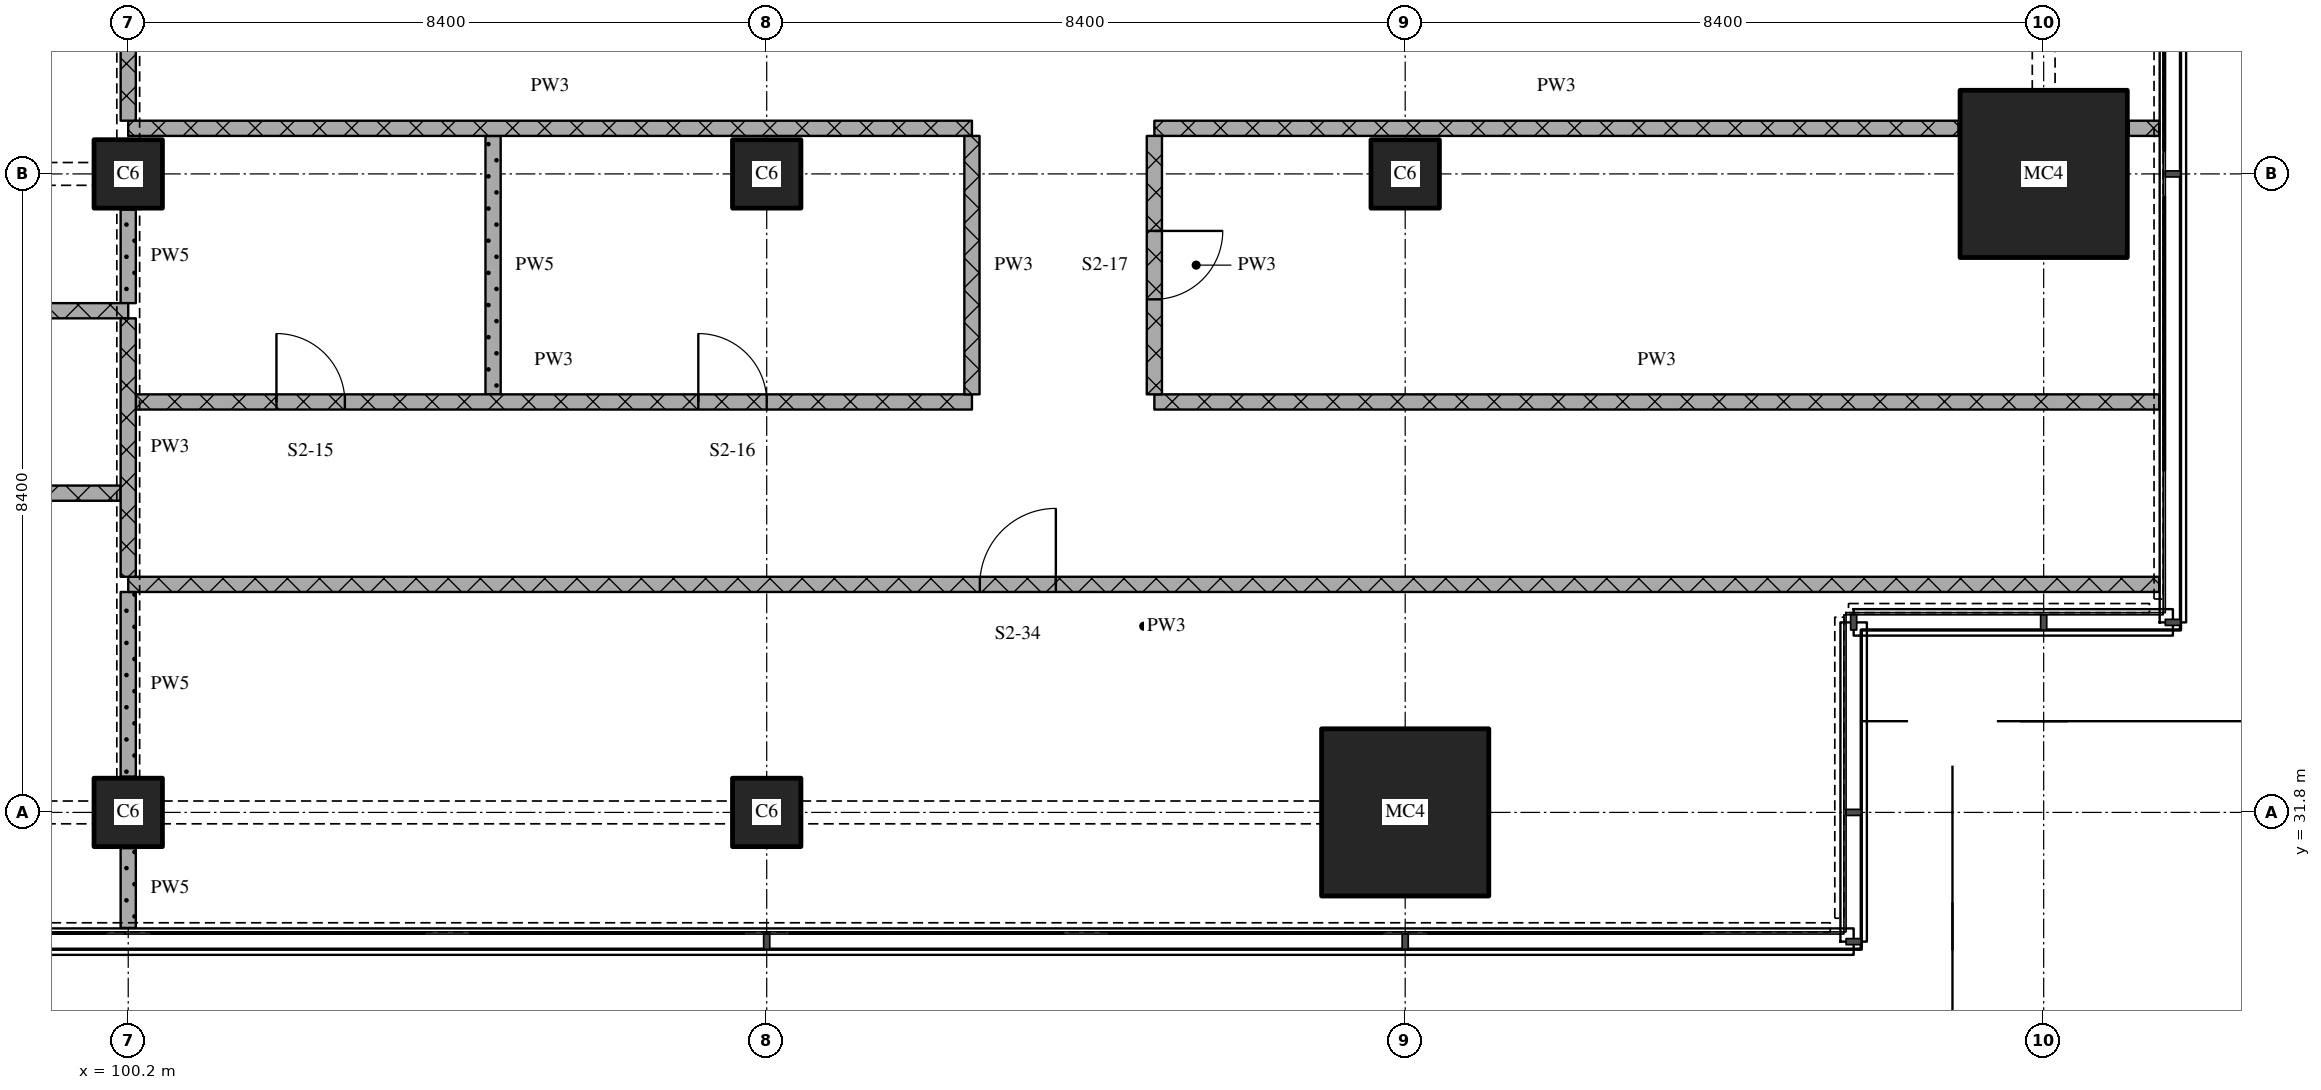
"""IFC4 building model, lengths in metres.
Left out: names, types, materials, properties, quantities, classifications, styles, units other than length and angle.
Written with IfcOpenShell. Run it as: python <this file> out.ifc"""

import sys

from ifc_helpers import new_model, si_unit, direction, frame, frame_2d, origin, origin_2d, place, context, subcontext, project, spatial, rectangle, extrude, element, fill, save


model = new_model("IFC4")
c1 = context("Model", 3, precision=1e-05, world=origin(), true_north=direction((0.0, 1.0)))
c2 = subcontext(c1, "Body", "Model", "MODEL_VIEW")
j1 = project(units=[si_unit("LENGTHUNIT", "METRE"), si_unit("PLANEANGLEUNIT", "RADIAN")], contexts=[c1])
p1 = place(None, origin())
s1 = spatial("IfcSite", under=j1, at=p1, CompositionType="ELEMENT")
p2 = place(p1, origin())
s2 = spatial("IfcBuilding", under=s1, at=p2, CompositionType="ELEMENT")
p3 = place(p2, frame((0.0, 0.0, 28.2)))
s3 = spatial("IfcBuildingStorey", under=s2, at=p3, CompositionType="ELEMENT", Elevation=28.2)
for number, where, z_axis, x_axis in (
    (1, (100.2, 31.8, 0.0), (0.0, 0.0, 1.0), (1.0, 0.0, 0.0)),
    (2, (100.2, 40.2, 0.0), (0.0, 0.0, 1.0), (1.0, 0.0, 0.0)),
    (3, (108.6, 31.8, 0.0), (0.0, 0.0, 1.0), (1.0, 0.0, 0.0)),
    (4, (108.6, 40.2, 0.0), (0.0, 0.0, 1.0), (1.0, 0.0, 0.0)),
):
    element("IfcColumn", number, at=place(p3, frame(where, z_axis=z_axis, x_axis=x_axis)), inside=s3, PredefinedType="COLUMN", context=c2, shape_type="SweptSolid", body=[
        extrude(rectangle(XDim=0.9, YDim=0.9, at=origin_2d()), origin(), (0.0, 0.0, 1.0), 4.5),
    ])
p4 = place(p3, frame((117.0, 31.8, 0.0), z_axis=(0.0, 0.0, 1.0), x_axis=(1.0, 0.0, 0.0)))
e5 = element("IfcColumn", 5, at=p4, inside=s3, PredefinedType="COLUMN", context=c2, shape_type="SweptSolid", body=[
    extrude(rectangle(XDim=2.2, YDim=2.2, at=origin_2d()), origin(), (0.0, 0.0, 1.0), 4.5),
])
p5 = place(p3, frame((117.0, 40.2, 0.0), z_axis=(0.0, 0.0, 1.0), x_axis=(1.0, 0.0, 0.0)))
e6 = element("IfcColumn", 6, at=p5, inside=s3, PredefinedType="COLUMN", context=c2, shape_type="SweptSolid", body=[
    extrude(rectangle(XDim=0.9, YDim=0.9, at=origin_2d()), origin(), (0.0, 0.0, 1.0), 4.5),
])
p6 = place(p3, frame((125.4, 40.2, 0.0), z_axis=(0.0, 0.0, 1.0), x_axis=(1.0, 0.0, 0.0)))
e7 = element("IfcColumn", 7, at=p6, inside=s3, PredefinedType="COLUMN", context=c2, shape_type="SweptSolid", body=[
    extrude(rectangle(XDim=2.2, YDim=2.2, at=origin_2d()), origin(), (0.0, 0.0, 1.0), 4.5),
])
p7 = place(p3, frame((126.92, 34.8, 0.0), z_axis=(0.0, 0.0, 1.0), x_axis=(-1.0, 0.0, 0.0)))
e8 = element("IfcWall", 8, at=p7, inside=s3, PredefinedType="PARTITIONING", context=c2, shape_type="SweptSolid", body=[
    extrude(rectangle(XDim=26.72, YDim=0.2, at=frame_2d((13.36, 0.0))), origin(), (0.0, 0.0, 1.0), 4.2),
])
p8 = place(p7, frame((14.516, 0.0, 0.0)))
e9 = element("IfcOpeningElement", 9, at=p8, cuts=e8, PredefinedType="OPENING", context=c2, shape_type="SweptSolid", body=[
    extrude(rectangle(XDim=1.0, YDim=2.1, at=frame_2d((0.5, 1.05))), frame((0.0, 0.11, 0.0), z_axis=(0.0, -1.0, 0.0), x_axis=(1.0, 0.0, 0.0)), (0.0, 0.0, 1.0), 0.22),
])
p9 = place(p3, frame((100.1, 36.0, 0.0), z_axis=(0.0, 0.0, 1.0), x_axis=(-1.0, 0.0, 0.0)))
e10 = element("IfcWall", 10, at=p9, inside=s3, PredefinedType="PARTITIONING", context=c2, shape_type="SweptSolid", body=[
    extrude(rectangle(XDim=25.0, YDim=0.2, at=frame_2d((12.5, 0.0))), origin(), (0.0, 0.0, 1.0), 4.2),
])
p10 = place(p9, frame((12.0, 0.0, 0.0)))
e11 = element("IfcOpeningElement", 11, at=p10, cuts=e10, PredefinedType="OPENING", context=c2, shape_type="SweptSolid", body=[
    extrude(rectangle(XDim=1.0, YDim=2.1, at=frame_2d((0.5, 1.05))), frame((0.0, 0.11, 0.0), z_axis=(0.0, -1.0, 0.0), x_axis=(1.0, 0.0, 0.0)), (0.0, 0.0, 1.0), 0.22),
])
p11 = place(p3, frame((100.3, 37.2, 0.0), z_axis=(0.0, 0.0, 1.0), x_axis=(1.0, 0.0, 0.0)))
e12 = element("IfcWall", 12, at=p11, inside=s3, PredefinedType="PARTITIONING", context=c2, shape_type="SweptSolid", body=[
    extrude(rectangle(XDim=11.0, YDim=0.2, at=frame_2d((5.5, 0.0))), origin(), (0.0, 0.0, 1.0), 4.2),
])
p12 = place(p11, frame((1.85, 0.0, 0.0)))
e13 = element("IfcOpeningElement", 13, at=p12, cuts=e12, PredefinedType="OPENING", context=c2, shape_type="SweptSolid", body=[
    extrude(rectangle(XDim=0.9, YDim=2.1, at=frame_2d((0.45, 1.05))), frame((0.0, 0.11, 0.0), z_axis=(0.0, -1.0, 0.0), x_axis=(1.0, 0.0, 0.0)), (0.0, 0.0, 1.0), 0.22),
])
p13 = place(p11, frame((7.4, 0.0, 0.0)))
e14 = element("IfcOpeningElement", 14, at=p13, cuts=e12, PredefinedType="OPENING", context=c2, shape_type="SweptSolid", body=[
    extrude(rectangle(XDim=0.9, YDim=2.1, at=frame_2d((0.45, 1.05))), frame((0.0, 0.11, 0.0), z_axis=(0.0, -1.0, 0.0), x_axis=(1.0, 0.0, 0.0)), (0.0, 0.0, 1.0), 0.22),
])
p14 = place(p3, frame((113.7, 37.2, 0.0), z_axis=(0.0, 0.0, 1.0), x_axis=(1.0, 0.0, 0.0)))
e15 = element("IfcWall", 15, at=p14, inside=s3, PredefinedType="PARTITIONING", context=c2, shape_type="SweptSolid", body=[
    extrude(rectangle(XDim=13.22, YDim=0.2, at=frame_2d((6.61, 0.0))), origin(), (0.0, 0.0, 1.0), 4.2),
])
p15 = place(p3, frame((88.8, 38.4, 0.0), z_axis=(0.0, 0.0, 1.0), x_axis=(1.0, 0.0, 0.0)))
e16 = element("IfcWall", 16, at=p15, inside=s3, PredefinedType="PARTITIONING", context=c2, shape_type="SweptSolid", body=[
    extrude(rectangle(XDim=11.4, YDim=0.2, at=frame_2d((5.7, 0.0))), origin(), (0.0, 0.0, 1.0), 4.2),
])
p16 = place(p15, frame((4.95, 0.0, 0.0)))
e17 = element("IfcOpeningElement", 17, at=p16, cuts=e16, PredefinedType="OPENING", context=c2, shape_type="SweptSolid", body=[
    extrude(rectangle(XDim=0.9, YDim=2.1, at=frame_2d((0.45, 1.05))), frame((0.0, 0.11, 0.0), z_axis=(0.0, -1.0, 0.0), x_axis=(1.0, 0.0, 0.0)), (0.0, 0.0, 1.0), 0.22),
])
p17 = place(p15, frame((9.15, 0.0, 0.0)))
e18 = element("IfcOpeningElement", 18, at=p17, cuts=e16, PredefinedType="OPENING", context=c2, shape_type="SweptSolid", body=[
    extrude(rectangle(XDim=0.9, YDim=2.1, at=frame_2d((0.45, 1.05))), frame((0.0, 0.11, 0.0), z_axis=(0.0, -1.0, 0.0), x_axis=(1.0, 0.0, 0.0)), (0.0, 0.0, 1.0), 0.22),
])
p18 = place(p3, frame((100.2, 40.8, 0.0), z_axis=(0.0, 0.0, 1.0), x_axis=(1.0, 0.0, 0.0)))
e19 = element("IfcWall", 19, at=p18, inside=s3, PredefinedType="PARTITIONING", context=c2, shape_type="SweptSolid", body=[
    extrude(rectangle(XDim=11.1, YDim=0.2, at=frame_2d((5.55, 0.0))), origin(), (0.0, 0.0, 1.0), 4.2),
])
p19 = place(p3, frame((113.7, 40.8, 0.0), z_axis=(0.0, 0.0, 1.0), x_axis=(1.0, 0.0, 0.0)))
e20 = element("IfcWall", 20, at=p19, inside=s3, PredefinedType="PARTITIONING", context=c2, shape_type="SweptSolid", body=[
    extrude(rectangle(XDim=10.58, YDim=0.2, at=frame_2d((5.29, 0.0))), origin(), (0.0, 0.0, 1.0), 4.2),
])
p20 = place(p3, frame((126.52, 40.8, 0.0), z_axis=(0.0, 0.0, 1.0), x_axis=(1.0, 0.0, 0.0)))
e21 = element("IfcWall", 21, at=p20, inside=s3, PredefinedType="PARTITIONING", context=c2, shape_type="SweptSolid", body=[
    extrude(rectangle(XDim=0.4, YDim=0.2, at=frame_2d((0.2, 0.0))), origin(), (0.0, 0.0, 1.0), 4.2),
])
p21 = place(p3, frame((100.2, 38.3, 0.0), z_axis=(0.0, 0.0, 1.0), x_axis=(0.0, -1.0, 0.0)))
e22 = element("IfcWall", 22, at=p21, inside=s3, PredefinedType="PARTITIONING", context=c2, shape_type="SweptSolid", body=[
    extrude(rectangle(XDim=3.4, YDim=0.2, at=frame_2d((1.7, 0.0))), origin(), (0.0, 0.0, 1.0), 3.7),
])
p22 = place(p3, frame((100.2, 43.1, 0.0), z_axis=(0.0, 0.0, 1.0), x_axis=(0.0, -1.0, 0.0)))
e23 = element("IfcWall", 23, at=p22, inside=s3, PredefinedType="PARTITIONING", context=c2, shape_type="SweptSolid", body=[
    extrude(rectangle(XDim=2.2, YDim=0.2, at=frame_2d((1.1, 0.0))), origin(), (0.0, 0.0, 1.0), 3.3),
])
p23 = place(p3, frame((100.2, 31.33, 0.0), z_axis=(0.0, 0.0, 1.0), x_axis=(0.0, -1.0, 0.0)))
e24 = element("IfcWall", 24, at=p23, inside=s3, PredefinedType="PARTITIONING", context=c2, shape_type="SweptSolid", body=[
    extrude(rectangle(XDim=1.05, YDim=0.2, at=frame_2d((0.525, 0.0))), origin(), (0.0, 0.0, 1.0), 4.2),
])
p24 = place(p3, frame((100.2, 34.7, 0.0), z_axis=(0.0, 0.0, 1.0), x_axis=(0.0, -1.0, 0.0)))
e25 = element("IfcWall", 25, at=p24, inside=s3, PredefinedType="PARTITIONING", context=c2, shape_type="SweptSolid", body=[
    extrude(rectangle(XDim=2.43, YDim=0.2, at=frame_2d((1.215, 0.0))), origin(), (0.0, 0.0, 1.0), 3.7),
])
p25 = place(p3, frame((100.2, 39.73, 0.0), z_axis=(0.0, 0.0, 1.0), x_axis=(0.0, -1.0, 0.0)))
e26 = element("IfcWall", 26, at=p25, inside=s3, PredefinedType="PARTITIONING", context=c2, shape_type="SweptSolid", body=[
    extrude(rectangle(XDim=1.23, YDim=0.2, at=frame_2d((0.615, 0.0))), origin(), (0.0, 0.0, 1.0), 3.7),
])
for number, where, z_axis, x_axis in (
    (27, (105.0, 40.7, 0.0), (0.0, 0.0, 1.0), (0.0, -1.0, 0.0)),
    (28, (111.3, 40.7, 0.0), (0.0, 0.0, 1.0), (0.0, -1.0, 0.0)),
):
    element("IfcWall", number, at=place(p3, frame(where, z_axis=z_axis, x_axis=x_axis)), inside=s3, PredefinedType="PARTITIONING", context=c2, shape_type="SweptSolid", body=[
        extrude(rectangle(XDim=3.4, YDim=0.2, at=frame_2d((1.7, 0.0))), origin(), (0.0, 0.0, 1.0), 4.2),
    ])
p26 = place(p3, frame((113.7, 40.7, 0.0), z_axis=(0.0, 0.0, 1.0), x_axis=(0.0, -1.0, 0.0)))
e29 = element("IfcWall", 29, at=p26, inside=s3, PredefinedType="PARTITIONING", context=c2, shape_type="SweptSolid", body=[
    extrude(rectangle(XDim=3.4, YDim=0.2, at=frame_2d((1.7, 0.0))), origin(), (0.0, 0.0, 1.0), 4.2),
])
p27 = place(p26, frame((1.25, 0.0, 0.0)))
e30 = element("IfcOpeningElement", 30, at=p27, cuts=e29, PredefinedType="OPENING", context=c2, shape_type="SweptSolid", body=[
    extrude(rectangle(XDim=0.9, YDim=2.1, at=frame_2d((0.45, 1.05))), frame((0.0, 0.11, 0.0), z_axis=(0.0, -1.0, 0.0), x_axis=(1.0, 0.0, 0.0)), (0.0, 0.0, 1.0), 0.22),
])
p28 = place(p8, origin())
e31 = element("IfcDoor", 31, at=p28, inside=s3, OperationType="SINGLE_SWING_RIGHT", PredefinedType="DOOR", context=c2, shape_type="SweptSolid", body=[
    extrude(rectangle(XDim=1.0, YDim=2.1, at=frame_2d((0.5, 1.05))), frame((0.0, 0.025, 0.0), z_axis=(0.0, -1.0, 0.0), x_axis=(1.0, 0.0, 0.0)), (0.0, 0.0, 1.0), 0.05),
])
fill(e9, e31)
p29 = place(p12, origin())
e32 = element("IfcDoor", 32, at=p29, inside=s3, OperationType="SINGLE_SWING_LEFT", PredefinedType="DOOR", context=c2, shape_type="SweptSolid", body=[
    extrude(rectangle(XDim=0.9, YDim=2.1, at=frame_2d((0.45, 1.05))), frame((0.0, 0.025, 0.0), z_axis=(0.0, -1.0, 0.0), x_axis=(1.0, 0.0, 0.0)), (0.0, 0.0, 1.0), 0.05),
])
fill(e13, e32)
p30 = place(p13, origin())
e33 = element("IfcDoor", 33, at=p30, inside=s3, OperationType="SINGLE_SWING_LEFT", PredefinedType="DOOR", context=c2, shape_type="SweptSolid", body=[
    extrude(rectangle(XDim=0.9, YDim=2.1, at=frame_2d((0.45, 1.05))), frame((0.0, 0.025, 0.0), z_axis=(0.0, -1.0, 0.0), x_axis=(1.0, 0.0, 0.0)), (0.0, 0.0, 1.0), 0.05),
])
fill(e14, e33)
p31 = place(p27, origin())
e34 = element("IfcDoor", 34, at=p31, inside=s3, OperationType="SINGLE_SWING_LEFT", PredefinedType="DOOR", context=c2, shape_type="SweptSolid", body=[
    extrude(rectangle(XDim=0.9, YDim=2.1, at=frame_2d((0.45, 1.05))), frame((0.0, 0.025, 0.0), z_axis=(0.0, -1.0, 0.0), x_axis=(1.0, 0.0, 0.0)), (0.0, 0.0, 1.0), 0.05),
])
fill(e30, e34)
save(model, sys.argv[1])
